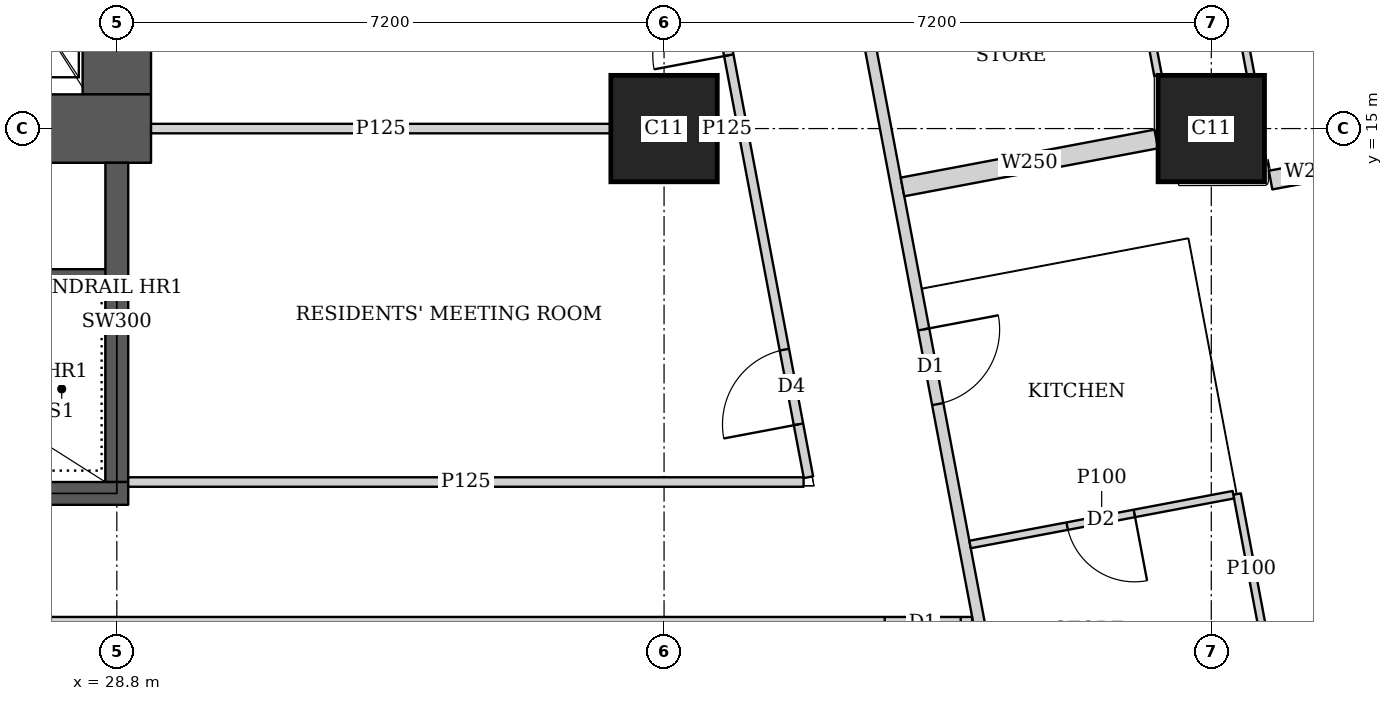
"""IFC4 building model, lengths in metres.
Left out: names, types, materials, properties, quantities, classifications, styles, units other than length and angle.
Written with IfcOpenShell. Run it as: python <this file> out.ifc"""

import sys

from ifc_helpers import new_model, si_unit, direction, frame, frame_2d, origin, origin_2d, place, context, subcontext, project, spatial, rectangle, extrude, element, fill, save


model = new_model("IFC4")
c1 = context("Model", 3, precision=1e-05, world=origin(), true_north=direction((0.0, 1.0)))
c2 = subcontext(c1, "Body", "Model", "MODEL_VIEW")
j1 = project(units=[si_unit("LENGTHUNIT", "METRE"), si_unit("PLANEANGLEUNIT", "RADIAN")], contexts=[c1])
p1 = place(None, origin())
s1 = spatial("IfcSite", under=j1, at=p1, CompositionType="ELEMENT")
p2 = place(p1, origin())
s2 = spatial("IfcBuilding", under=s1, at=p2, CompositionType="ELEMENT")
p3 = place(p2, frame((0.0, 0.0, 212.45)))
s3 = spatial("IfcBuildingStorey", under=s2, at=p3, CompositionType="ELEMENT", Elevation=212.45)
for number, where, z_axis, x_axis in (
    (1, (36.0, 15.0, 0.0), (0.0, 0.0, 1.0), (1.0, 0.0, 0.0)),
    (2, (43.2, 15.0, 0.0), (0.0, 0.0, 1.0), (1.0, 0.0, 0.0)),
):
    element("IfcColumn", number, at=place(p3, frame(where, z_axis=z_axis, x_axis=x_axis)), inside=s3, PredefinedType="COLUMN", context=c2, shape_type="SweptSolid", body=[
        extrude(rectangle(XDim=1.4, YDim=1.4, at=origin_2d()), origin(), (0.0, 0.0, 1.0), 3.75),
    ])
p4 = place(p3, frame((13.95, 15.0, 0.0), z_axis=(0.0, 0.0, 1.0), x_axis=(1.0, 0.0, 0.0)))
e3 = element("IfcWall", 3, at=p4, inside=s3, PredefinedType="SHEAR", context=c2, shape_type="SweptSolid", body=[
    extrude(rectangle(XDim=15.3, YDim=0.9, at=frame_2d((7.65, 0.0))), origin(), (0.0, 0.0, 1.0), 3.75),
])
p5 = place(p4, frame((4.45, 0.0, 0.0)))
e4 = element("IfcOpeningElement", 4, at=p5, cuts=e3, PredefinedType="OPENING", context=c2, shape_type="SweptSolid", body=[
    extrude(rectangle(XDim=1.8, YDim=2.1, at=frame_2d((0.9, 1.05))), frame((0.0, 0.46, 0.0), z_axis=(0.0, -1.0, 0.0), x_axis=(1.0, 0.0, 0.0)), (0.0, 0.0, 1.0), 0.92),
])
p6 = place(p4, frame((10.7, 0.0, 0.0)))
e5 = element("IfcOpeningElement", 5, at=p6, cuts=e3, PredefinedType="OPENING", context=c2, shape_type="SweptSolid", body=[
    extrude(rectangle(XDim=1.1, YDim=2.1, at=frame_2d((0.55, 1.05))), frame((0.0, 0.46, 0.0), z_axis=(0.0, -1.0, 0.0), x_axis=(1.0, 0.0, 0.0)), (0.0, 0.0, 1.0), 0.92),
])
p7 = place(p3, frame((28.8, 15.45, 0.0), z_axis=(0.0, 0.0, 1.0), x_axis=(0.0, 1.0, 0.0)))
e6 = element("IfcWall", 6, at=p7, inside=s3, PredefinedType="SHEAR", context=c2, shape_type="SweptSolid", body=[
    extrude(rectangle(XDim=14.1, YDim=0.9, at=frame_2d((7.05, 0.0))), origin(), (0.0, 0.0, 1.0), 3.75),
])
p8 = place(p3, frame((21.45, 10.2, 0.0), z_axis=(0.0, 0.0, 1.0), x_axis=(1.0, 0.0, 0.0)))
e7 = element("IfcWall", 7, at=p8, inside=s3, PredefinedType="SHEAR", context=c2, shape_type="SweptSolid", body=[
    extrude(rectangle(XDim=7.5, YDim=0.3, at=frame_2d((3.75, 0.0))), origin(), (0.0, 0.0, 1.0), 3.75),
])
p9 = place(p8, frame((0.5, 0.0, 0.0)))
e8 = element("IfcOpeningElement", 8, at=p9, cuts=e7, PredefinedType="OPENING", context=c2, shape_type="SweptSolid", body=[
    extrude(rectangle(XDim=1.1, YDim=2.1, at=frame_2d((0.55, 1.05))), frame((0.0, 0.16, 0.0), z_axis=(0.0, -1.0, 0.0), x_axis=(1.0, 0.0, 0.0)), (0.0, 0.0, 1.0), 0.32),
])
p10 = place(p3, frame((28.8, 10.35, 0.0), z_axis=(0.0, 0.0, 1.0), x_axis=(0.0, 1.0, 0.0)))
e9 = element("IfcWall", 9, at=p10, inside=s3, PredefinedType="SHEAR", context=c2, shape_type="SweptSolid", body=[
    extrude(rectangle(XDim=4.2, YDim=0.3, at=frame_2d((2.1, 0.0))), origin(), (0.0, 0.0, 1.0), 3.75),
])
p11 = place(p3, frame((50.653, 2.703, 0.0), z_axis=(0.0, 0.0, 1.0), x_axis=(-0.185612026696, 0.982623109613, 0.0)))
e10 = element("IfcWall", 10, at=p11, inside=s3, PredefinedType="SOLIDWALL", context=c2, shape_type="SweptSolid", body=[
    extrude(rectangle(XDim=41.393, YDim=0.2, at=frame_2d((20.697, 0.0))), origin(), (0.0, 0.0, 1.0), 3.5),
])
p12 = place(p11, frame((1.633, 0.0, 0.9)))
e11 = element("IfcOpeningElement", 11, at=p12, cuts=e10, PredefinedType="OPENING", context=c2, shape_type="SweptSolid", body=[
    extrude(rectangle(XDim=1.8, YDim=1.5, at=frame_2d((0.9, 0.75))), frame((0.0, 0.11, 0.0), z_axis=(0.0, -1.0, 0.0), x_axis=(1.0, 0.0, 0.0)), (0.0, 0.0, 1.0), 0.22),
])
p13 = place(p11, frame((6.032, 0.0, 0.9)))
e12 = element("IfcOpeningElement", 12, at=p13, cuts=e10, PredefinedType="OPENING", context=c2, shape_type="SweptSolid", body=[
    extrude(rectangle(XDim=1.8, YDim=1.5, at=frame_2d((0.9, 0.75))), frame((0.0, 0.11, 0.0), z_axis=(0.0, -1.0, 0.0), x_axis=(1.0, 0.0, 0.0)), (0.0, 0.0, 1.0), 0.22),
])
p14 = place(p11, frame((9.848, 0.0, 0.9)))
e13 = element("IfcOpeningElement", 13, at=p14, cuts=e10, PredefinedType="OPENING", context=c2, shape_type="SweptSolid", body=[
    extrude(rectangle(XDim=1.8, YDim=1.5, at=frame_2d((0.9, 0.75))), frame((0.0, 0.11, 0.0), z_axis=(0.0, -1.0, 0.0), x_axis=(1.0, 0.0, 0.0)), (0.0, 0.0, 1.0), 0.22),
])
p15 = place(p11, frame((13.664, 0.0, 0.9)))
e14 = element("IfcOpeningElement", 14, at=p15, cuts=e10, PredefinedType="OPENING", context=c2, shape_type="SweptSolid", body=[
    extrude(rectangle(XDim=1.8, YDim=1.5, at=frame_2d((0.9, 0.75))), frame((0.0, 0.11, 0.0), z_axis=(0.0, -1.0, 0.0), x_axis=(1.0, 0.0, 0.0)), (0.0, 0.0, 1.0), 0.22),
])
p16 = place(p11, frame((17.481, 0.0, 0.9)))
e15 = element("IfcOpeningElement", 15, at=p16, cuts=e10, PredefinedType="OPENING", context=c2, shape_type="SweptSolid", body=[
    extrude(rectangle(XDim=1.8, YDim=1.5, at=frame_2d((0.9, 0.75))), frame((0.0, 0.11, 0.0), z_axis=(0.0, -1.0, 0.0), x_axis=(1.0, 0.0, 0.0)), (0.0, 0.0, 1.0), 0.22),
])
p17 = place(p11, frame((21.297, 0.0, 0.9)))
e16 = element("IfcOpeningElement", 16, at=p17, cuts=e10, PredefinedType="OPENING", context=c2, shape_type="SweptSolid", body=[
    extrude(rectangle(XDim=1.8, YDim=1.5, at=frame_2d((0.9, 0.75))), frame((0.0, 0.11, 0.0), z_axis=(0.0, -1.0, 0.0), x_axis=(1.0, 0.0, 0.0)), (0.0, 0.0, 1.0), 0.22),
])
p18 = place(p11, frame((25.113, 0.0, 0.9)))
e17 = element("IfcOpeningElement", 17, at=p18, cuts=e10, PredefinedType="OPENING", context=c2, shape_type="SweptSolid", body=[
    extrude(rectangle(XDim=1.8, YDim=1.5, at=frame_2d((0.9, 0.75))), frame((0.0, 0.11, 0.0), z_axis=(0.0, -1.0, 0.0), x_axis=(1.0, 0.0, 0.0)), (0.0, 0.0, 1.0), 0.22),
])
p19 = place(p11, frame((28.93, 0.0, 0.9)))
e18 = element("IfcOpeningElement", 18, at=p19, cuts=e10, PredefinedType="OPENING", context=c2, shape_type="SweptSolid", body=[
    extrude(rectangle(XDim=1.8, YDim=1.5, at=frame_2d((0.9, 0.75))), frame((0.0, 0.11, 0.0), z_axis=(0.0, -1.0, 0.0), x_axis=(1.0, 0.0, 0.0)), (0.0, 0.0, 1.0), 0.22),
])
p20 = place(p11, frame((32.746, 0.0, 0.9)))
e19 = element("IfcOpeningElement", 19, at=p20, cuts=e10, PredefinedType="OPENING", context=c2, shape_type="SweptSolid", body=[
    extrude(rectangle(XDim=1.8, YDim=1.5, at=frame_2d((0.9, 0.75))), frame((0.0, 0.11, 0.0), z_axis=(0.0, -1.0, 0.0), x_axis=(1.0, 0.0, 0.0)), (0.0, 0.0, 1.0), 0.22),
])
p21 = place(p11, frame((36.481, 0.0, 0.9)))
e20 = element("IfcOpeningElement", 20, at=p21, cuts=e10, PredefinedType="OPENING", context=c2, shape_type="SweptSolid", body=[
    extrude(rectangle(XDim=1.8, YDim=1.5, at=frame_2d((0.9, 0.75))), frame((0.0, 0.11, 0.0), z_axis=(0.0, -1.0, 0.0), x_axis=(1.0, 0.0, 0.0)), (0.0, 0.0, 1.0), 0.22),
])
p22 = place(p3, frame((40.053, 8.5, 0.0), z_axis=(0.0, 0.0, 1.0), x_axis=(-1.0, 0.0, 0.0)))
e21 = element("IfcWall", 21, at=p22, inside=s3, PredefinedType="SOLIDWALL", context=c2, shape_type="SweptSolid", body=[
    extrude(rectangle(XDim=31.052, YDim=0.15, at=frame_2d((15.526, 0.0))), origin(), (0.0, 0.0, 1.0), 3.5),
])
p23 = place(p22, frame((29.178, 0.0, 0.0)))
e22 = element("IfcOpeningElement", 22, at=p23, cuts=e21, PredefinedType="OPENING", context=c2, shape_type="SweptSolid", body=[
    extrude(rectangle(XDim=1.0, YDim=2.1, at=frame_2d((0.5, 1.05))), frame((0.0, 0.085, 0.0), z_axis=(0.0, -1.0, 0.0), x_axis=(1.0, 0.0, 0.0)), (0.0, 0.0, 1.0), 0.17),
])
p24 = place(p22, frame((19.953, 0.0, 0.0)))
e23 = element("IfcOpeningElement", 23, at=p24, cuts=e21, PredefinedType="OPENING", context=c2, shape_type="SweptSolid", body=[
    extrude(rectangle(XDim=1.0, YDim=2.1, at=frame_2d((0.5, 1.05))), frame((0.0, 0.085, 0.0), z_axis=(0.0, -1.0, 0.0), x_axis=(1.0, 0.0, 0.0)), (0.0, 0.0, 1.0), 0.17),
])
p25 = place(p22, frame((12.753, 0.0, 0.0)))
e24 = element("IfcOpeningElement", 24, at=p25, cuts=e21, PredefinedType="OPENING", context=c2, shape_type="SweptSolid", body=[
    extrude(rectangle(XDim=1.0, YDim=2.1, at=frame_2d((0.5, 1.05))), frame((0.0, 0.085, 0.0), z_axis=(0.0, -1.0, 0.0), x_axis=(1.0, 0.0, 0.0)), (0.0, 0.0, 1.0), 0.17),
])
p26 = place(p22, frame((0.15, 0.0, 0.0)))
e25 = element("IfcOpeningElement", 25, at=p26, cuts=e21, PredefinedType="OPENING", context=c2, shape_type="SweptSolid", body=[
    extrude(rectangle(XDim=1.0, YDim=2.1, at=frame_2d((0.5, 1.05))), frame((0.0, 0.085, 0.0), z_axis=(0.0, -1.0, 0.0), x_axis=(1.0, 0.0, 0.0)), (0.0, 0.0, 1.0), 0.17),
])
p27 = place(p3, frame((33.68, 42.723, 0.0), z_axis=(0.0, 0.0, 1.0), x_axis=(0.185601160014, -0.982625162207, 0.0)))
e26 = element("IfcWall", 26, at=p27, inside=s3, PredefinedType="SOLIDWALL", context=c2, shape_type="SweptSolid", body=[
    extrude(rectangle(XDim=41.051, YDim=0.15, at=frame_2d((20.526, 0.0))), origin(), (0.0, 0.0, 1.0), 2.5),
])
p28 = place(p27, frame((12.307, 0.0, 0.0)))
e27 = element("IfcOpeningElement", 27, at=p28, cuts=e26, PredefinedType="OPENING", context=c2, shape_type="SweptSolid", body=[
    extrude(rectangle(XDim=1.0, YDim=2.1, at=frame_2d((0.5, 1.05))), frame((0.0, 0.085, 0.0), z_axis=(0.0, -1.0, 0.0), x_axis=(1.0, 0.0, 0.0)), (0.0, 0.0, 1.0), 0.17),
])
p29 = place(p27, frame((16.123, 0.0, 0.0)))
e28 = element("IfcOpeningElement", 28, at=p29, cuts=e26, PredefinedType="OPENING", context=c2, shape_type="SweptSolid", body=[
    extrude(rectangle(XDim=1.0, YDim=2.1, at=frame_2d((0.5, 1.05))), frame((0.0, 0.085, 0.0), z_axis=(0.0, -1.0, 0.0), x_axis=(1.0, 0.0, 0.0)), (0.0, 0.0, 1.0), 0.17),
])
p30 = place(p27, frame((30.902, 0.0, 0.0)))
e29 = element("IfcOpeningElement", 29, at=p30, cuts=e26, PredefinedType="OPENING", context=c2, shape_type="SweptSolid", body=[
    extrude(rectangle(XDim=1.0, YDim=2.1, at=frame_2d((0.5, 1.05))), frame((0.0, 0.085, 0.0), z_axis=(0.0, -1.0, 0.0), x_axis=(1.0, 0.0, 0.0)), (0.0, 0.0, 1.0), 0.17),
])
p31 = place(p3, frame((41.894, 25.366, 0.0), z_axis=(0.0, 0.0, 1.0), x_axis=(0.185612905165, -0.982622943675, 0.0)))
e30 = element("IfcWall", 30, at=p31, inside=s3, PredefinedType="PARTITIONING", context=c2, shape_type="SweptSolid", body=[
    extrude(rectangle(XDim=9.827, YDim=0.1, at=frame_2d((4.913, 0.0))), origin(), (0.0, 0.0, 1.0), 2.5),
])
p32 = place(p31, frame((0.151, 0.0, 0.0)))
e31 = element("IfcOpeningElement", 31, at=p32, cuts=e30, PredefinedType="OPENING", context=c2, shape_type="SweptSolid", body=[
    extrude(rectangle(XDim=0.9, YDim=2.1, at=frame_2d((0.45, 1.05))), frame((0.0, 0.06, 0.0), z_axis=(0.0, -1.0, 0.0), x_axis=(1.0, 0.0, 0.0)), (0.0, 0.0, 1.0), 0.12),
])
p33 = place(p31, frame((5.05, 0.0, 0.0)))
e32 = element("IfcOpeningElement", 32, at=p33, cuts=e30, PredefinedType="OPENING", context=c2, shape_type="SweptSolid", body=[
    extrude(rectangle(XDim=0.9, YDim=2.1, at=frame_2d((0.45, 1.05))), frame((0.0, 0.06, 0.0), z_axis=(0.0, -1.0, 0.0), x_axis=(1.0, 0.0, 0.0)), (0.0, 0.0, 1.0), 0.12),
])
p34 = place(p31, frame((7.783, 0.0, 0.0)))
e33 = element("IfcOpeningElement", 33, at=p34, cuts=e30, PredefinedType="OPENING", context=c2, shape_type="SweptSolid", body=[
    extrude(rectangle(XDim=0.9, YDim=2.1, at=frame_2d((0.45, 1.05))), frame((0.0, 0.06, 0.0), z_axis=(0.0, -1.0, 0.0), x_axis=(1.0, 0.0, 0.0)), (0.0, 0.0, 1.0), 0.12),
])
p35 = place(p3, frame((40.706, 25.192, 0.0), z_axis=(0.0, 0.0, 1.0), x_axis=(0.185629824463, -0.982619747547, 0.0)))
e34 = element("IfcWall", 34, at=p35, inside=s3, PredefinedType="PARTITIONING", context=c2, shape_type="SweptSolid", body=[
    extrude(rectangle(XDim=9.659, YDim=0.1, at=frame_2d((4.83, 0.0))), origin(), (0.0, 0.0, 1.0), 2.5),
])
p36 = place(p35, frame((0.575, 0.0, 0.0)))
e35 = element("IfcOpeningElement", 35, at=p36, cuts=e34, PredefinedType="OPENING", context=c2, shape_type="SweptSolid", body=[
    extrude(rectangle(XDim=0.9, YDim=2.1, at=frame_2d((0.45, 1.05))), frame((0.0, 0.06, 0.0), z_axis=(0.0, -1.0, 0.0), x_axis=(1.0, 0.0, 0.0)), (0.0, 0.0, 1.0), 0.12),
])
p37 = place(p35, frame((4.166, 0.0, 0.0)))
e36 = element("IfcOpeningElement", 36, at=p37, cuts=e34, PredefinedType="OPENING", context=c2, shape_type="SweptSolid", body=[
    extrude(rectangle(XDim=0.9, YDim=2.1, at=frame_2d((0.45, 1.05))), frame((0.0, 0.06, 0.0), z_axis=(0.0, -1.0, 0.0), x_axis=(1.0, 0.0, 0.0)), (0.0, 0.0, 1.0), 0.12),
])
p38 = place(p35, frame((2.483, 0.0, 0.0)))
e37 = element("IfcOpeningElement", 37, at=p38, cuts=e34, PredefinedType="OPENING", context=c2, shape_type="SweptSolid", body=[
    extrude(rectangle(XDim=0.9, YDim=2.1, at=frame_2d((0.45, 1.05))), frame((0.0, 0.06, 0.0), z_axis=(0.0, -1.0, 0.0), x_axis=(1.0, 0.0, 0.0)), (0.0, 0.0, 1.0), 0.12),
])
p39 = place(p35, frame((6.074, 0.0, 0.0)))
e38 = element("IfcOpeningElement", 38, at=p39, cuts=e34, PredefinedType="OPENING", context=c2, shape_type="SweptSolid", body=[
    extrude(rectangle(XDim=0.9, YDim=2.1, at=frame_2d((0.45, 1.05))), frame((0.0, 0.06, 0.0), z_axis=(0.0, -1.0, 0.0), x_axis=(1.0, 0.0, 0.0)), (0.0, 0.0, 1.0), 0.12),
])
p40 = place(p3, frame((43.539, 10.192, 0.0), z_axis=(0.0, 0.0, 1.0), x_axis=(0.185443145218, -0.982654995353, 0.0)))
e39 = element("IfcWall", 39, at=p40, inside=s3, PredefinedType="PARTITIONING", context=c2, shape_type="SweptSolid", body=[
    extrude(rectangle(XDim=2.017, YDim=0.1, at=frame_2d((1.008, 0.0))), origin(), (0.0, 0.0, 1.0), 3.5),
])
p41 = place(p3, frame((43.49, 10.183, 0.0), z_axis=(0.0, 0.0, 1.0), x_axis=(-0.982588017646, -0.185797706064, 0.0)))
e40 = element("IfcWall", 40, at=p41, inside=s3, PredefinedType="PARTITIONING", context=c2, shape_type="SweptSolid", body=[
    extrude(rectangle(XDim=3.525, YDim=0.1, at=frame_2d((1.763, 0.0))), origin(), (0.0, 0.0, 1.0), 3.5),
])
p42 = place(p41, frame((1.325, 0.0, 0.0)))
e41 = element("IfcOpeningElement", 41, at=p42, cuts=e40, PredefinedType="OPENING", context=c2, shape_type="SweptSolid", body=[
    extrude(rectangle(XDim=0.9, YDim=2.1, at=frame_2d((0.45, 1.05))), frame((0.0, 0.06, 0.0), z_axis=(0.0, -1.0, 0.0), x_axis=(1.0, 0.0, 0.0)), (0.0, 0.0, 1.0), 0.12),
])
p43 = place(p3, frame((45.09, 14.531, 0.0), z_axis=(0.0, 0.0, 1.0), x_axis=(-0.982737354171, -0.185006196431, 0.0)))
e42 = element("IfcWall", 42, at=p43, inside=s3, PredefinedType="SOLIDWALL", context=c2, shape_type="SweptSolid", body=[
    extrude(rectangle(XDim=1.13, YDim=0.25, at=frame_2d((0.565, 0.0))), origin(), (0.0, 0.0, 1.0), 2.05),
])
p44 = place(p3, frame((42.476, 14.863, 0.0), z_axis=(0.0, 0.0, 1.0), x_axis=(-0.982603567712, -0.185715450942, 0.0)))
e43 = element("IfcWall", 43, at=p44, inside=s3, PredefinedType="SOLIDWALL", context=c2, shape_type="SweptSolid", body=[
    extrude(rectangle(XDim=3.398, YDim=0.25, at=frame_2d((1.699, 0.0))), origin(), (0.0, 0.0, 1.0), 3.5),
])
p45 = place(p3, frame((28.95, 10.35, 0.0), z_axis=(0.0, 0.0, 1.0), x_axis=(1.0, 0.0, 0.0)))
e44 = element("IfcWall", 44, at=p45, inside=s3, PredefinedType="PARTITIONING", context=c2, shape_type="SweptSolid", body=[
    extrude(rectangle(XDim=8.886, YDim=0.125, at=frame_2d((4.443, 0.0))), origin(), (0.0, 0.0, 1.0), 3.5),
])
p46 = place(p3, frame((37.9, 10.413, 0.0), z_axis=(0.0, 0.0, 1.0), x_axis=(-0.185589740669, 0.982627319058, 0.0)))
e45 = element("IfcWall", 45, at=p46, inside=s3, PredefinedType="PARTITIONING", context=c2, shape_type="SweptSolid", body=[
    extrude(rectangle(XDim=24.602, YDim=0.125, at=frame_2d((12.301, 0.0))), origin(), (0.0, 0.0, 1.0), 2.5),
])
p47 = place(p46, frame((0.708, 0.0, 0.0)))
e46 = element("IfcOpeningElement", 46, at=p47, cuts=e45, PredefinedType="OPENING", context=c2, shape_type="SweptSolid", body=[
    extrude(rectangle(XDim=1.0, YDim=2.1, at=frame_2d((0.5, 1.05))), frame((0.0, 0.073, 0.0), z_axis=(0.0, -1.0, 0.0), x_axis=(1.0, 0.0, 0.0)), (0.0, 0.0, 1.0), 0.145),
])
p48 = place(p46, frame((5.65, 0.0, 0.0)))
e47 = element("IfcOpeningElement", 47, at=p48, cuts=e45, PredefinedType="OPENING", context=c2, shape_type="SweptSolid", body=[
    extrude(rectangle(XDim=1.0, YDim=2.1, at=frame_2d((0.5, 1.05))), frame((0.0, 0.073, 0.0), z_axis=(0.0, -1.0, 0.0), x_axis=(1.0, 0.0, 0.0)), (0.0, 0.0, 1.0), 0.145),
])
p49 = place(p46, frame((13.124, 0.0, 0.0)))
e48 = element("IfcOpeningElement", 48, at=p49, cuts=e45, PredefinedType="OPENING", context=c2, shape_type="SweptSolid", body=[
    extrude(rectangle(XDim=1.0, YDim=2.1, at=frame_2d((0.5, 1.05))), frame((0.0, 0.073, 0.0), z_axis=(0.0, -1.0, 0.0), x_axis=(1.0, 0.0, 0.0)), (0.0, 0.0, 1.0), 0.145),
])
p50 = place(p46, frame((16.94, 0.0, 0.0)))
e49 = element("IfcOpeningElement", 49, at=p50, cuts=e45, PredefinedType="OPENING", context=c2, shape_type="SweptSolid", body=[
    extrude(rectangle(XDim=1.0, YDim=2.1, at=frame_2d((0.5, 1.05))), frame((0.0, 0.073, 0.0), z_axis=(0.0, -1.0, 0.0), x_axis=(1.0, 0.0, 0.0)), (0.0, 0.0, 1.0), 0.145),
])
p51 = place(p46, frame((20.9, 0.0, 0.0)))
e50 = element("IfcOpeningElement", 50, at=p51, cuts=e45, PredefinedType="OPENING", context=c2, shape_type="SweptSolid", body=[
    extrude(rectangle(XDim=1.0, YDim=2.1, at=frame_2d((0.5, 1.05))), frame((0.0, 0.073, 0.0), z_axis=(0.0, -1.0, 0.0), x_axis=(1.0, 0.0, 0.0)), (0.0, 0.0, 1.0), 0.145),
])
p52 = place(p3, frame((29.25, 15.0, 0.0), z_axis=(0.0, 0.0, 1.0), x_axis=(1.0, 0.0, 0.0)))
e51 = element("IfcWall", 51, at=p52, inside=s3, PredefinedType="PARTITIONING", context=c2, shape_type="SweptSolid", body=[
    extrude(rectangle(XDim=6.049, YDim=0.125, at=frame_2d((3.024, 0.0))), origin(), (0.0, 0.0, 1.0), 3.5),
])
p53 = place(p3, frame((36.701, 15.0, 0.0), z_axis=(0.0, 0.0, 1.0), x_axis=(1.0, 0.0, 0.0)))
e52 = element("IfcWall", 52, at=p53, inside=s3, PredefinedType="PARTITIONING", context=c2, shape_type="SweptSolid", body=[
    extrude(rectangle(XDim=0.257, YDim=0.125, at=frame_2d((0.128, 0.0))), origin(), (0.0, 0.0, 1.0), 3.5),
])
p54 = place(p3, frame((23.0, 13.05, 0.0), z_axis=(0.0, 0.0, 1.0), x_axis=(1.0, 0.0, 0.0)))
e53 = element("IfcWall", 53, at=p54, inside=s3, PredefinedType="SHEAR", context=c2, shape_type="SweptSolid", body=[
    extrude(rectangle(XDim=5.8, YDim=0.2, at=frame_2d((2.9, 0.0))), origin(), (0.0, 0.0, 1.0), 3.75),
])
p55 = place(p26, origin())
e54 = element("IfcDoor", 54, at=p55, inside=s3, OperationType="SINGLE_SWING_LEFT", PredefinedType="DOOR", context=c2, shape_type="SweptSolid", body=[
    extrude(rectangle(XDim=1.0, YDim=2.1, at=frame_2d((0.5, 1.05))), frame((0.0, 0.025, 0.0), z_axis=(0.0, -1.0, 0.0), x_axis=(1.0, 0.0, 0.0)), (0.0, 0.0, 1.0), 0.05),
])
fill(e25, e54)
p56 = place(p30, origin())
e55 = element("IfcDoor", 55, at=p56, inside=s3, OperationType="SINGLE_SWING_LEFT", PredefinedType="DOOR", context=c2, shape_type="SweptSolid", body=[
    extrude(rectangle(XDim=1.0, YDim=2.1, at=frame_2d((0.5, 1.05))), frame((0.0, 0.025, 0.0), z_axis=(0.0, -1.0, 0.0), x_axis=(1.0, 0.0, 0.0)), (0.0, 0.0, 1.0), 0.05),
])
fill(e29, e55)
p57 = place(p42, origin())
e56 = element("IfcDoor", 56, at=p57, inside=s3, OperationType="SINGLE_SWING_LEFT", PredefinedType="DOOR", context=c2, shape_type="SweptSolid", body=[
    extrude(rectangle(XDim=0.9, YDim=2.1, at=frame_2d((0.45, 1.05))), frame((0.0, 0.025, 0.0), z_axis=(0.0, -1.0, 0.0), x_axis=(1.0, 0.0, 0.0)), (0.0, 0.0, 1.0), 0.05),
])
fill(e41, e56)
p58 = place(p47, origin())
e57 = element("IfcDoor", 57, at=p58, inside=s3, OperationType="SINGLE_SWING_LEFT", PredefinedType="DOOR", context=c2, shape_type="SweptSolid", body=[
    extrude(rectangle(XDim=1.0, YDim=2.1, at=frame_2d((0.5, 1.05))), frame((0.0, 0.025, 0.0), z_axis=(0.0, -1.0, 0.0), x_axis=(1.0, 0.0, 0.0)), (0.0, 0.0, 1.0), 0.05),
])
fill(e46, e57)
p59 = place(p48, origin())
e58 = element("IfcDoor", 58, at=p59, inside=s3, OperationType="SINGLE_SWING_LEFT", PredefinedType="DOOR", context=c2, shape_type="SweptSolid", body=[
    extrude(rectangle(XDim=1.0, YDim=2.1, at=frame_2d((0.5, 1.05))), frame((0.0, 0.025, 0.0), z_axis=(0.0, -1.0, 0.0), x_axis=(1.0, 0.0, 0.0)), (0.0, 0.0, 1.0), 0.05),
])
fill(e47, e58)
save(model, sys.argv[1])
